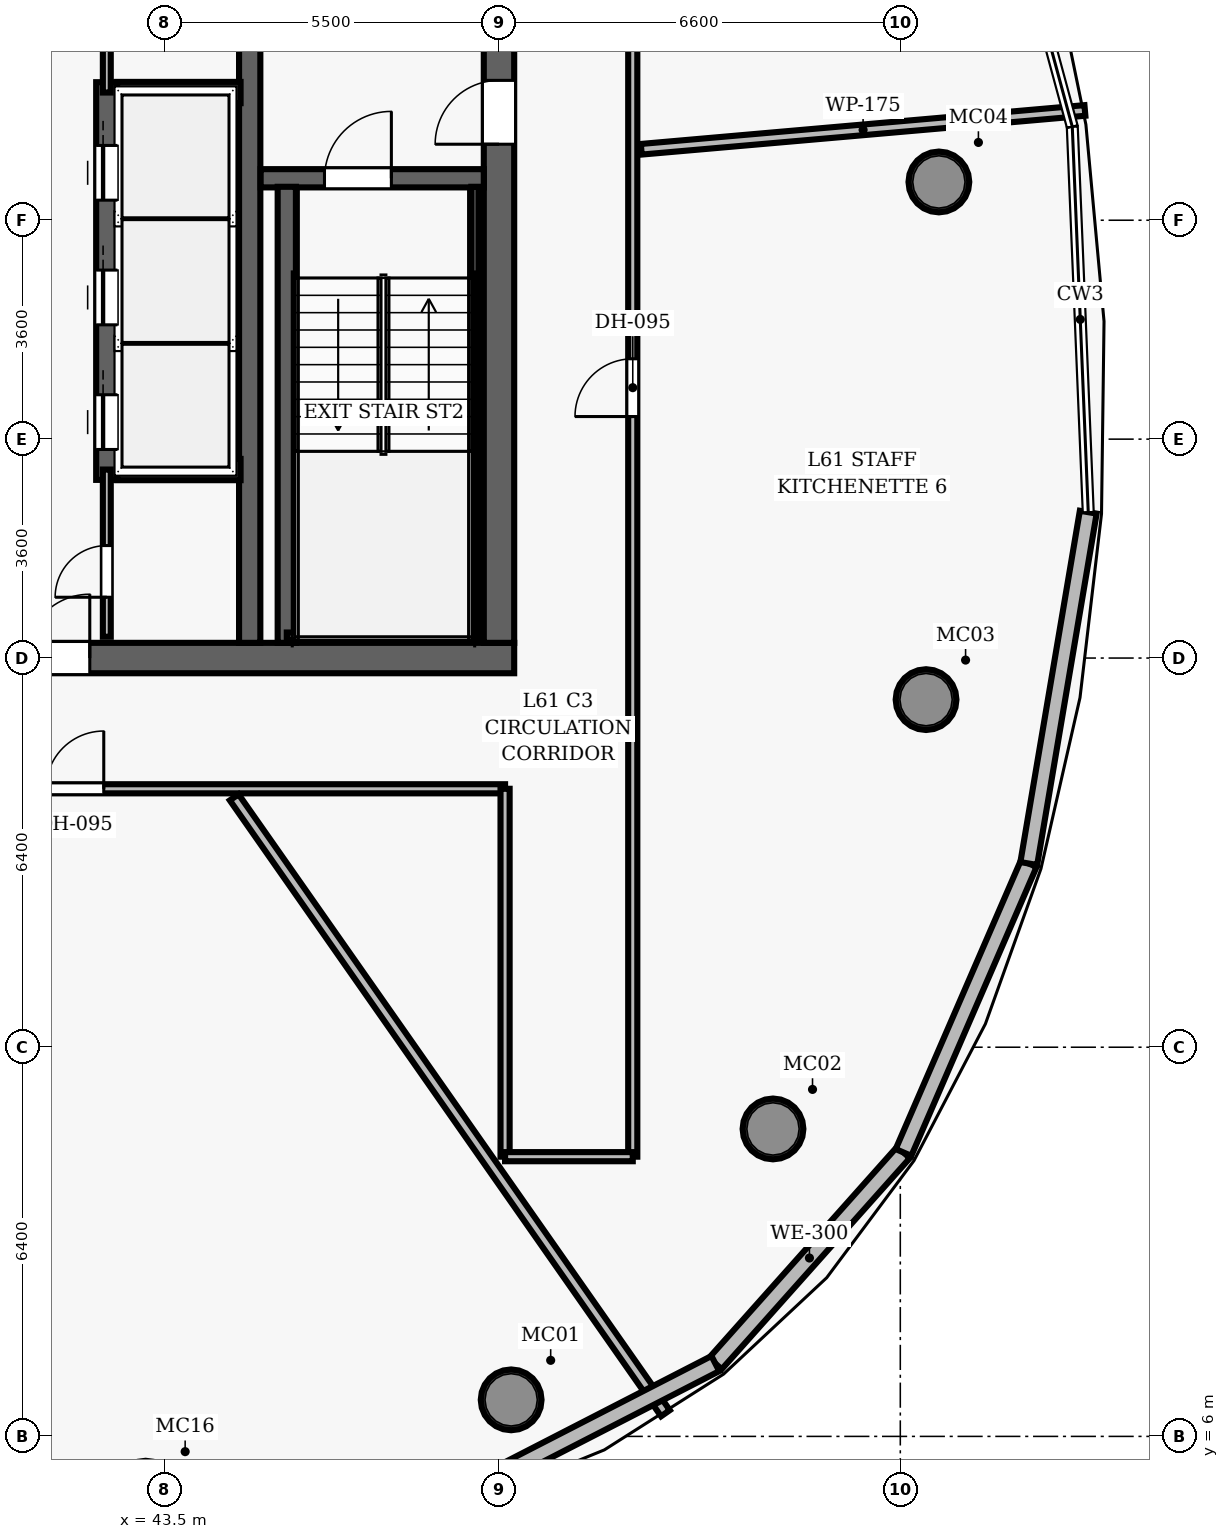
"""IFC4 building model, lengths in metres.
Left out: names, types, materials, properties, quantities, classifications, styles, units other than length and angle.
Written with IfcOpenShell. Run it as: python <this file> out.ifc"""

import sys

from ifc_helpers import new_model, si_unit, direction, frame, frame_2d, origin, origin_2d, place, context, subcontext, project, spatial, rectangle, hollow_circle, extrude, element, fill, save


model = new_model("IFC4")
c1 = context("Model", 3, precision=1e-05, world=origin(), true_north=direction((0.0, 1.0)))
c2 = subcontext(c1, "Body", "Model", "MODEL_VIEW")
j1 = project(units=[si_unit("LENGTHUNIT", "METRE"), si_unit("PLANEANGLEUNIT", "RADIAN")], contexts=[c1])
p1 = place(None, origin())
s1 = spatial("IfcSite", under=j1, at=p1, CompositionType="ELEMENT")
p2 = place(p1, origin())
s2 = spatial("IfcBuilding", under=s1, at=p2, CompositionType="ELEMENT")
p3 = place(p2, frame((0.0, 0.0, 242.05)))
s3 = spatial("IfcBuildingStorey", under=s2, at=p3, CompositionType="ELEMENT", Elevation=242.05)
p4 = place(p3, frame((26.75, 18.8, 0.0), z_axis=(0.0, 0.0, 1.0), x_axis=(1.0, 0.0, 0.0)))
e1 = element("IfcWall", 1, at=p4, inside=s3, PredefinedType="SHEAR", context=c2, shape_type="SweptSolid", body=[
    extrude(rectangle(XDim=22.5, YDim=0.5, at=frame_2d((11.25, 0.0))), origin(), (0.0, 0.0, 1.0), 3.85),
])
p5 = place(p4, frame((14.47, 0.0, 0.0)))
e2 = element("IfcOpeningElement", 2, at=p5, cuts=e1, PredefinedType="OPENING", context=c2, shape_type="SweptSolid", body=[
    extrude(rectangle(XDim=1.05, YDim=2.15, at=frame_2d((0.525, 1.075))), frame((0.0, 0.26, 0.0), z_axis=(0.0, -1.0, 0.0), x_axis=(1.0, 0.0, 0.0)), (0.0, 0.0, 1.0), 0.52),
])
p6 = place(p3, frame((49.0, 19.05, 0.0), z_axis=(0.0, 0.0, 1.0), x_axis=(0.0, 1.0, 0.0)))
e3 = element("IfcWall", 3, at=p6, inside=s3, PredefinedType="SHEAR", context=c2, shape_type="SweptSolid", body=[
    extrude(rectangle(XDim=13.9, YDim=0.5, at=frame_2d((6.95, 0.0))), origin(), (0.0, 0.0, 1.0), 3.85),
])
p7 = place(p6, frame((8.2, 0.0, 0.0)))
e4 = element("IfcOpeningElement", 4, at=p7, cuts=e3, PredefinedType="OPENING", context=c2, shape_type="SweptSolid", body=[
    extrude(rectangle(XDim=1.05, YDim=2.15, at=frame_2d((0.525, 1.075))), frame((0.0, 0.26, 0.0), z_axis=(0.0, -1.0, 0.0), x_axis=(1.0, 0.0, 0.0)), (0.0, 0.0, 1.0), 0.52),
])
p8 = place(p3, frame((44.9, 19.05, 0.0), z_axis=(0.0, 0.0, 1.0), x_axis=(0.0, 1.0, 0.0)))
e5 = element("IfcWall", 5, at=p8, inside=s3, PredefinedType="SHEAR", context=c2, shape_type="SweptSolid", body=[
    extrude(rectangle(XDim=13.9, YDim=0.35, at=frame_2d((6.95, 0.0))), origin(), (0.0, 0.0, 1.0), 3.85),
])
for number, where, z_axis, x_axis in (
    (6, (49.2, 6.601, 0.0), (0.0, 0.0, 1.0), (1.0, 0.0, 0.0)),
    (7, (53.506, 11.056, 0.0), (0.0, 0.0, 1.0), (1.0, 0.0, 0.0)),
    (8, (56.024, 18.116, 0.0), (0.0, 0.0, 1.0), (1.0, 0.0, 0.0)),
    (9, (56.235, 26.629, 0.0), (0.0, 0.0, 1.0), (1.0, 0.0, 0.0)),
):
    element("IfcColumn", number, at=place(p3, frame(where, z_axis=z_axis, x_axis=x_axis)), inside=s3, PredefinedType="COLUMN", context=c2, shape_type="SweptSolid", body=[
        extrude(hollow_circle(Radius=0.5, WallThickness=0.045, at=origin_2d()), origin(), (0.0, 0.0, 1.0), 3.85),
    ])
p9 = place(p3, frame((45.08, 26.69, 0.0), z_axis=(0.0, 0.0, 1.0), x_axis=(1.0, 0.0, 0.0)))
e10 = element("IfcWall", 10, at=p9, inside=s3, PredefinedType="SHEAR", context=c2, shape_type="SweptSolid", body=[
    extrude(rectangle(XDim=3.67, YDim=0.3, at=frame_2d((1.835, 0.0))), origin(), (0.0, 0.0, 1.0), 3.85),
])
p10 = place(p9, frame((1.05, 0.0, 0.0)))
e11 = element("IfcOpeningElement", 11, at=p10, cuts=e10, PredefinedType="OPENING", context=c2, shape_type="SweptSolid", body=[
    extrude(rectangle(XDim=1.1, YDim=2.15, at=frame_2d((0.55, 1.075))), frame((0.0, 0.16, 0.0), z_axis=(0.0, -1.0, 0.0), x_axis=(1.0, 0.0, 0.0)), (0.0, 0.0, 1.0), 0.32),
])
p11 = place(p3, frame((45.51, 19.05, 0.0), z_axis=(0.0, 0.0, 1.0), x_axis=(0.0, 1.0, 0.0)))
e12 = element("IfcWall", 12, at=p11, inside=s3, PredefinedType="SHEAR", context=c2, shape_type="SweptSolid", body=[
    extrude(rectangle(XDim=7.5, YDim=0.3, at=frame_2d((3.75, 0.0))), origin(), (0.0, 0.0, 1.0), 3.85),
])
p12 = place(p3, frame((48.605, 19.1, 0.0), z_axis=(0.0, 0.0, 1.0), x_axis=(0.0, 1.0, 0.0)))
e13 = element("IfcWall", 13, at=p12, inside=s3, PredefinedType="SHEAR", context=c2, shape_type="SweptSolid", body=[
    extrude(rectangle(XDim=7.45, YDim=0.12, at=frame_2d((3.725, 0.0))), origin(), (0.0, 0.0, 1.0), 3.85),
])
p13 = place(p3, frame((45.51, 19.16, 0.0), z_axis=(0.0, 0.0, 1.0), x_axis=(1.0, 0.0, 0.0)))
e14 = element("IfcWall", 14, at=p13, inside=s3, PredefinedType="SHEAR", context=c2, shape_type="SweptSolid", body=[
    extrude(rectangle(XDim=3.095, YDim=0.12, at=frame_2d((1.547, 0.0))), origin(), (0.0, 0.0, 1.0), 3.85),
])
p14 = place(p3, frame((42.55, 21.73, 0.0), z_axis=(0.0, 0.0, 1.0), x_axis=(0.0, 1.0, 0.0)))
e15 = element("IfcWall", 15, at=p14, inside=s3, PredefinedType="SHEAR", context=c2, shape_type="SweptSolid", body=[
    extrude(rectangle(XDim=6.54, YDim=0.35, at=frame_2d((3.27, 0.0))), origin(), (0.0, 0.0, 1.0), 3.04),
])
p15 = place(p14, frame((0.5, 0.0, 0.0)))
e16 = element("IfcOpeningElement", 16, at=p15, cuts=e15, PredefinedType="OPENING", context=c2, shape_type="SweptSolid", body=[
    extrude(rectangle(XDim=0.9, YDim=2.15, at=frame_2d((0.45, 1.075))), frame((0.0, 0.185, 0.0), z_axis=(0.0, -1.0, 0.0), x_axis=(1.0, 0.0, 0.0)), (0.0, 0.0, 1.0), 0.37),
])
p16 = place(p14, frame((2.55, 0.0, 0.0)))
e17 = element("IfcOpeningElement", 17, at=p16, cuts=e15, PredefinedType="OPENING", context=c2, shape_type="SweptSolid", body=[
    extrude(rectangle(XDim=0.9, YDim=2.15, at=frame_2d((0.45, 1.075))), frame((0.0, 0.185, 0.0), z_axis=(0.0, -1.0, 0.0), x_axis=(1.0, 0.0, 0.0)), (0.0, 0.0, 1.0), 0.37),
])
p17 = place(p14, frame((4.6, 0.0, 0.0)))
e18 = element("IfcOpeningElement", 18, at=p17, cuts=e15, PredefinedType="OPENING", context=c2, shape_type="SweptSolid", body=[
    extrude(rectangle(XDim=0.9, YDim=2.15, at=frame_2d((0.45, 1.075))), frame((0.0, 0.185, 0.0), z_axis=(0.0, -1.0, 0.0), x_axis=(1.0, 0.0, 0.0)), (0.0, 0.0, 1.0), 0.37),
])
for number, where, z_axis, x_axis in (
    (19, (42.72, 21.9, 0.0), (0.0, 0.0, 1.0), (1.0, 0.0, 0.0)),
    (20, (42.72, 28.1, 0.0), (0.0, 0.0, 1.0), (1.0, 0.0, 0.0)),
):
    element("IfcWall", number, at=place(p3, frame(where, z_axis=z_axis, x_axis=x_axis)), inside=s3, PredefinedType="SHEAR", context=c2, shape_type="SweptSolid", body=[
        extrude(rectangle(XDim=2.03, YDim=0.35, at=frame_2d((1.015, 0.0))), origin(), (0.0, 0.0, 1.0), 3.04),
    ])
p18 = place(p3, frame((42.55, 28.1, 0.0), z_axis=(0.0, 0.0, 1.0), x_axis=(0.0, 1.0, 0.0)))
e21 = element("IfcWall", 21, at=p18, inside=s3, PredefinedType="PARTITIONING", context=c2, shape_type="SweptSolid", body=[
    extrude(rectangle(XDim=4.75, YDim=0.13, at=frame_2d((2.375, 0.0))), origin(), (0.0, 0.0, 1.0), 3.04),
])
p19 = place(p18, frame((1.4, 0.0, 0.0)))
e22 = element("IfcOpeningElement", 22, at=p19, cuts=e21, PredefinedType="OPENING", context=c2, shape_type="SweptSolid", body=[
    extrude(rectangle(XDim=0.85, YDim=2.1, at=frame_2d((0.425, 1.05))), frame((0.0, 0.075, 0.0), z_axis=(0.0, -1.0, 0.0), x_axis=(1.0, 0.0, 0.0)), (0.0, 0.0, 1.0), 0.15),
])
p20 = place(p3, frame((42.55, 19.15, 0.0), z_axis=(0.0, 0.0, 1.0), x_axis=(0.0, 1.0, 0.0)))
e23 = element("IfcWall", 23, at=p20, inside=s3, PredefinedType="PARTITIONING", context=c2, shape_type="SweptSolid", body=[
    extrude(rectangle(XDim=2.75, YDim=0.13, at=frame_2d((1.375, 0.0))), origin(), (0.0, 0.0, 1.0), 3.04),
])
p21 = place(p20, frame((0.65, 0.0, 0.0)))
e24 = element("IfcOpeningElement", 24, at=p21, cuts=e23, PredefinedType="OPENING", context=c2, shape_type="SweptSolid", body=[
    extrude(rectangle(XDim=0.85, YDim=2.1, at=frame_2d((0.425, 1.05))), frame((0.0, 0.075, 0.0), z_axis=(0.0, -1.0, 0.0), x_axis=(1.0, 0.0, 0.0)), (0.0, 0.0, 1.0), 0.15),
])
p22 = place(p3, frame((26.9, 16.65, 0.0), z_axis=(0.0, 0.0, 1.0), x_axis=(1.0, 0.0, 0.0)))
e25 = element("IfcWall", 25, at=p22, inside=s3, PredefinedType="PARTITIONING", context=c2, shape_type="SweptSolid", body=[
    extrude(rectangle(XDim=22.2, YDim=0.15, at=frame_2d((11.1, 0.0))), origin(), (0.0, 0.0, 1.0), 3.04),
])
p23 = place(p22, frame((14.65, 0.0, 0.0)))
e26 = element("IfcOpeningElement", 26, at=p23, cuts=e25, PredefinedType="OPENING", context=c2, shape_type="SweptSolid", body=[
    extrude(rectangle(XDim=0.95, YDim=2.15, at=frame_2d((0.475, 1.075))), frame((0.0, 0.085, 0.0), z_axis=(0.0, -1.0, 0.0), x_axis=(1.0, 0.0, 0.0)), (0.0, 0.0, 1.0), 0.17),
])
p24 = place(p3, frame((51.2, 10.6, 0.0), z_axis=(0.0, 0.0, 1.0), x_axis=(0.0, 1.0, 0.0)))
e27 = element("IfcWall", 27, at=p24, inside=s3, PredefinedType="PARTITIONING", context=c2, shape_type="SweptSolid", body=[
    extrude(rectangle(XDim=30.79, YDim=0.15, at=frame_2d((15.395, 0.0))), origin(), (0.0, 0.0, 1.0), 3.04),
])
p25 = place(p24, frame((19.149, 0.0, 0.0)))
e28 = element("IfcOpeningElement", 28, at=p25, cuts=e27, PredefinedType="OPENING", context=c2, shape_type="SweptSolid", body=[
    extrude(rectangle(XDim=1.5, YDim=2.2, at=frame_2d((0.75, 1.1))), frame((0.0, 0.085, 0.0), z_axis=(0.0, -1.0, 0.0), x_axis=(1.0, 0.0, 0.0)), (0.0, 0.0, 1.0), 0.17),
])
p26 = place(p24, frame((12.171, 0.0, 0.0)))
e29 = element("IfcOpeningElement", 29, at=p26, cuts=e27, PredefinedType="OPENING", context=c2, shape_type="SweptSolid", body=[
    extrude(rectangle(XDim=0.95, YDim=2.15, at=frame_2d((0.475, 1.075))), frame((0.0, 0.085, 0.0), z_axis=(0.0, -1.0, 0.0), x_axis=(1.0, 0.0, 0.0)), (0.0, 0.0, 1.0), 0.17),
])
p27 = place(p3, frame((49.1, 10.6, 0.0), z_axis=(0.0, 0.0, 1.0), x_axis=(0.0, 1.0, 0.0)))
e30 = element("IfcWall", 30, at=p27, inside=s3, PredefinedType="PARTITIONING", context=c2, shape_type="SweptSolid", body=[
    extrude(rectangle(XDim=6.05, YDim=0.15, at=frame_2d((3.025, 0.0))), origin(), (0.0, 0.0, 1.0), 3.04),
])
p28 = place(p3, frame((49.1, 10.6, 0.0), z_axis=(0.0, 0.0, 1.0), x_axis=(1.0, 0.0, 0.0)))
e31 = element("IfcWall", 31, at=p28, inside=s3, PredefinedType="PARTITIONING", context=c2, shape_type="SweptSolid", body=[
    extrude(rectangle(XDim=2.1, YDim=0.15, at=frame_2d((1.05, 0.0))), origin(), (0.0, 0.0, 1.0), 3.04),
])
p29 = place(p3, frame((51.34, 27.167, 0.0), z_axis=(0.0, 0.0, 1.0), x_axis=(0.996193536582, 0.08716901784, 0.0)))
e32 = element("IfcWall", 32, at=p29, inside=s3, PredefinedType="PARTITIONING", context=c2, shape_type="SweptSolid", body=[
    extrude(rectangle(XDim=7.324, YDim=0.175, at=frame_2d((3.662, 0.0))), origin(), (0.0, 0.0, 1.0), 3.04),
])
p30 = place(p3, frame((44.645, 16.51, 0.0), z_axis=(0.0, 0.0, 1.0), x_axis=(0.573564372876, -0.819160491093, 0.0)))
e33 = element("IfcWall", 33, at=p30, inside=s3, PredefinedType="PARTITIONING", context=c2, shape_type="SweptSolid", body=[
    extrude(rectangle(XDim=12.365, YDim=0.175, at=frame_2d((6.183, 0.0))), origin(), (0.0, 0.0, 1.0), 3.04),
])
p31 = place(p3, frame((55.653, 10.669, 0.0), z_axis=(0.0, 0.0, 1.0), x_axis=(-0.665305013969, -0.746571656566, 0.0)))
e34 = element("IfcWall", 34, at=p31, inside=s3, PredefinedType="SOLIDWALL", context=c2, shape_type="SweptSolid", body=[
    extrude(rectangle(XDim=4.65, YDim=0.28, at=frame_2d((2.325, 0.0))), origin(), (0.0, 0.0, 1.0), 3.625),
])
p32 = place(p3, frame((57.713, 15.421, 0.0), z_axis=(0.0, 0.0, 1.0), x_axis=(-0.397846863497, -0.917451836995, 0.0)))
e35 = element("IfcWall", 35, at=p32, inside=s3, PredefinedType="SOLIDWALL", context=c2, shape_type="SweptSolid", body=[
    extrude(rectangle(XDim=5.179, YDim=0.28, at=frame_2d((2.59, 0.0))), origin(), (0.0, 0.0, 1.0), 3.625),
])
p33 = place(p3, frame((58.691, 21.199, 0.0), z_axis=(0.0, 0.0, 1.0), x_axis=(-0.166857680579, -0.985980990908, 0.0)))
e36 = element("IfcWall", 36, at=p33, inside=s3, PredefinedType="SOLIDWALL", context=c2, shape_type="SweptSolid", body=[
    extrude(rectangle(XDim=5.86, YDim=0.28, at=frame_2d((2.93, 0.0))), origin(), (0.0, 0.0, 1.0), 3.625),
])
p34 = place(p3, frame((52.559, 7.198, 0.0), z_axis=(0.0, 0.0, 1.0), x_axis=(-0.889373798751, -0.457180758666, 0.0)))
e37 = element("IfcWall", 37, at=p34, inside=s3, PredefinedType="SOLIDWALL", context=c2, shape_type="SweptSolid", body=[
    extrude(rectangle(XDim=4.651, YDim=0.28, at=frame_2d((2.325, 0.0))), origin(), (0.0, 0.0, 1.0), 3.625),
])
p35 = place(p10, origin())
e38 = element("IfcDoor", 38, at=p35, inside=s3, OperationType="SINGLE_SWING_RIGHT", PredefinedType="DOOR", context=c2, shape_type="SweptSolid", body=[
    extrude(rectangle(XDim=1.1, YDim=2.15, at=frame_2d((0.55, 1.075))), frame((0.0, 0.025, 0.0), z_axis=(0.0, -1.0, 0.0), x_axis=(1.0, 0.0, 0.0)), (0.0, 0.0, 1.0), 0.05),
])
fill(e11, e38)
p36 = place(p7, origin())
e39 = element("IfcDoor", 39, at=p36, inside=s3, OperationType="SINGLE_SWING_LEFT", PredefinedType="DOOR", context=c2, shape_type="SweptSolid", body=[
    extrude(rectangle(XDim=1.05, YDim=2.15, at=frame_2d((0.525, 1.075))), frame((0.0, 0.025, 0.0), z_axis=(0.0, -1.0, 0.0), x_axis=(1.0, 0.0, 0.0)), (0.0, 0.0, 1.0), 0.05),
])
fill(e4, e39)
p37 = place(p5, origin())
e40 = element("IfcDoor", 40, at=p37, inside=s3, OperationType="SINGLE_SWING_RIGHT", PredefinedType="DOOR", context=c2, shape_type="SweptSolid", body=[
    extrude(rectangle(XDim=1.05, YDim=2.15, at=frame_2d((0.525, 1.075))), frame((0.0, 0.025, 0.0), z_axis=(0.0, -1.0, 0.0), x_axis=(1.0, 0.0, 0.0)), (0.0, 0.0, 1.0), 0.05),
])
fill(e2, e40)
p38 = place(p21, origin())
e41 = element("IfcDoor", 41, at=p38, inside=s3, OperationType="SINGLE_SWING_LEFT", PredefinedType="DOOR", context=c2, shape_type="SweptSolid", body=[
    extrude(rectangle(XDim=0.85, YDim=2.1, at=frame_2d((0.425, 1.05))), frame((0.0, 0.025, 0.0), z_axis=(0.0, -1.0, 0.0), x_axis=(1.0, 0.0, 0.0)), (0.0, 0.0, 1.0), 0.05),
])
fill(e24, e41)
p39 = place(p23, origin())
e42 = element("IfcDoor", 42, at=p39, inside=s3, OperationType="SINGLE_SWING_RIGHT", PredefinedType="DOOR", context=c2, shape_type="SweptSolid", body=[
    extrude(rectangle(XDim=0.95, YDim=2.15, at=frame_2d((0.475, 1.075))), frame((0.0, 0.025, 0.0), z_axis=(0.0, -1.0, 0.0), x_axis=(1.0, 0.0, 0.0)), (0.0, 0.0, 1.0), 0.05),
])
fill(e26, e42)
p40 = place(p26, origin())
e43 = element("IfcDoor", 43, at=p40, inside=s3, OperationType="SINGLE_SWING_LEFT", PredefinedType="DOOR", context=c2, shape_type="SweptSolid", body=[
    extrude(rectangle(XDim=0.95, YDim=2.15, at=frame_2d((0.475, 1.075))), frame((0.0, 0.025, 0.0), z_axis=(0.0, -1.0, 0.0), x_axis=(1.0, 0.0, 0.0)), (0.0, 0.0, 1.0), 0.05),
])
fill(e29, e43)
p41 = place(p15, origin())
e44 = element("IfcDoor", 44, at=p41, inside=s3, OperationType="SLIDING_TO_LEFT", PredefinedType="DOOR", context=c2, shape_type="SweptSolid", body=[
    extrude(rectangle(XDim=0.9, YDim=2.15, at=frame_2d((0.45, 1.075))), frame((0.0, 0.025, 0.0), z_axis=(0.0, -1.0, 0.0), x_axis=(1.0, 0.0, 0.0)), (0.0, 0.0, 1.0), 0.05),
])
fill(e16, e44)
p42 = place(p16, origin())
e45 = element("IfcDoor", 45, at=p42, inside=s3, OperationType="SLIDING_TO_LEFT", PredefinedType="DOOR", context=c2, shape_type="SweptSolid", body=[
    extrude(rectangle(XDim=0.9, YDim=2.15, at=frame_2d((0.45, 1.075))), frame((0.0, 0.025, 0.0), z_axis=(0.0, -1.0, 0.0), x_axis=(1.0, 0.0, 0.0)), (0.0, 0.0, 1.0), 0.05),
])
fill(e17, e45)
p43 = place(p17, origin())
e46 = element("IfcDoor", 46, at=p43, inside=s3, OperationType="SLIDING_TO_LEFT", PredefinedType="DOOR", context=c2, shape_type="SweptSolid", body=[
    extrude(rectangle(XDim=0.9, YDim=2.15, at=frame_2d((0.45, 1.075))), frame((0.0, 0.025, 0.0), z_axis=(0.0, -1.0, 0.0), x_axis=(1.0, 0.0, 0.0)), (0.0, 0.0, 1.0), 0.05),
])
fill(e18, e46)
save(model, sys.argv[1])
